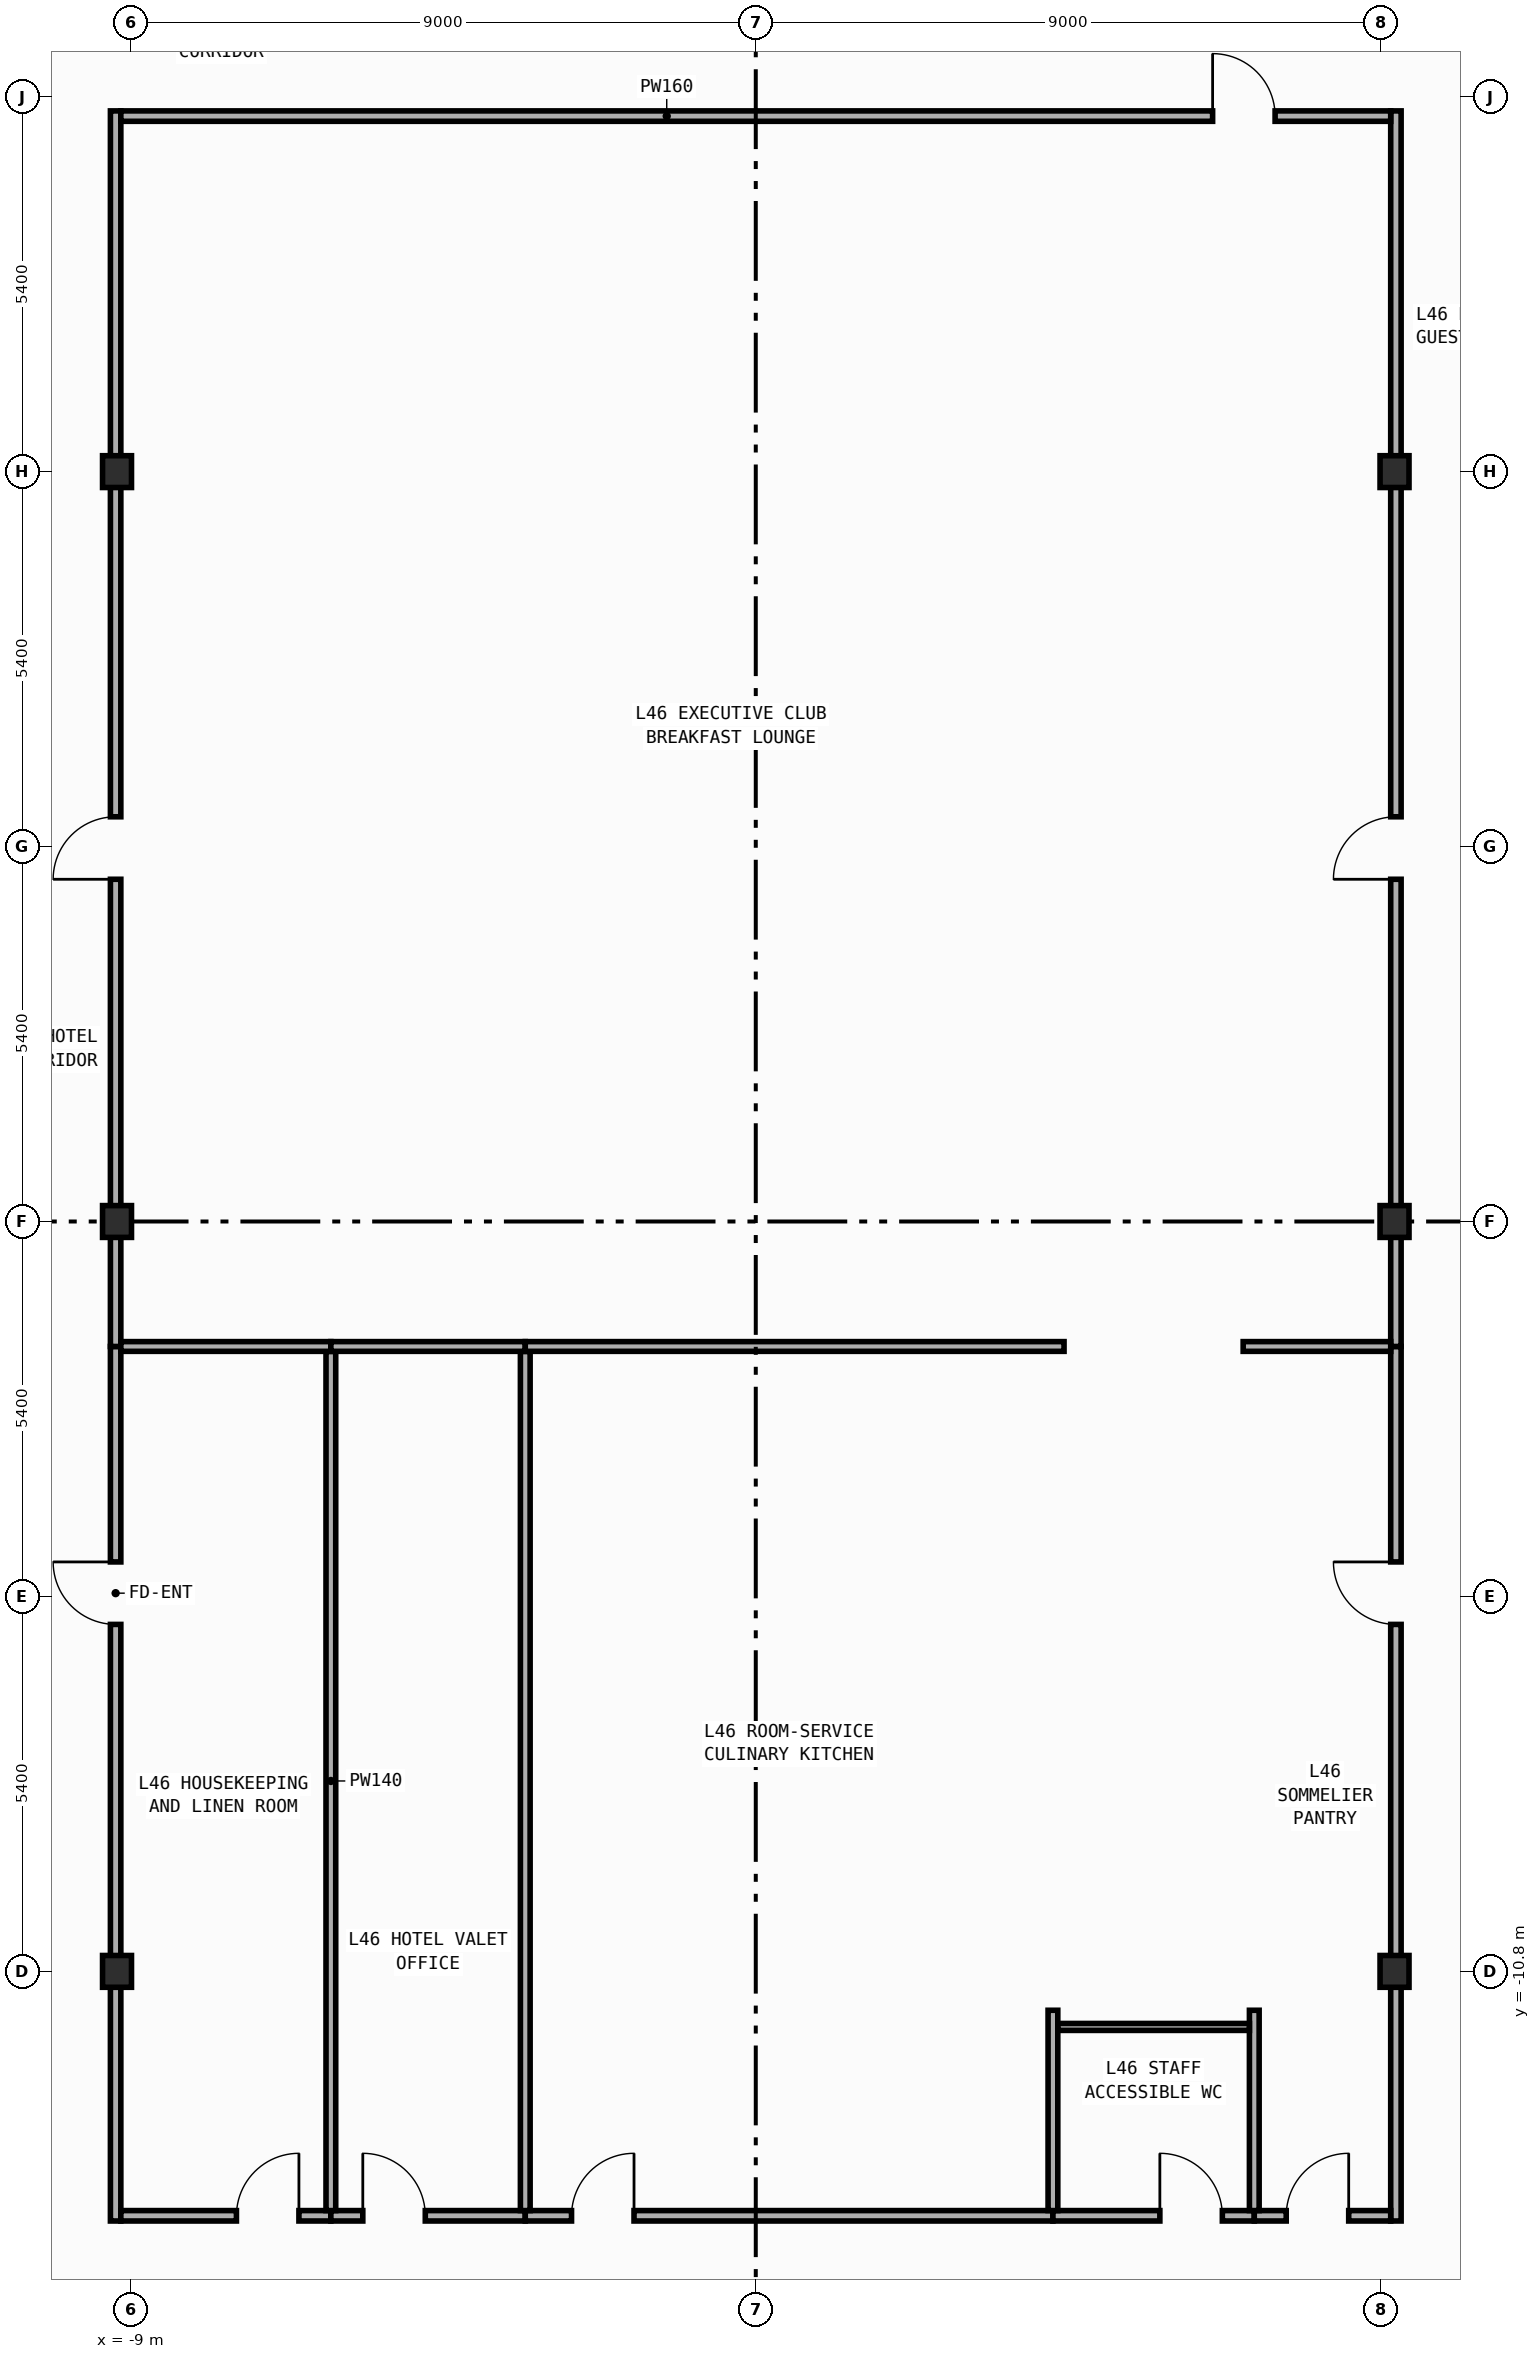
"""IFC4 building model, lengths in metres.
Left out: names, types, materials, properties, quantities, classifications, styles, units other than length and angle.
Written with IfcOpenShell. Run it as: python <this file> out.ifc"""

import sys

from ifc_helpers import new_model, si_unit, direction, frame, frame_2d, origin, origin_2d, place, context, subcontext, project, spatial, rectangle, i_section, extrude, element, fill, save


model = new_model("IFC4")
c1 = context("Model", 3, precision=1e-05, world=origin(), true_north=direction((0.0, 1.0)))
c2 = subcontext(c1, "Body", "Model", "MODEL_VIEW")
j1 = project(units=[si_unit("LENGTHUNIT", "METRE"), si_unit("PLANEANGLEUNIT", "RADIAN")], contexts=[c1])
p1 = place(None, origin())
s1 = spatial("IfcSite", under=j1, at=p1, CompositionType="ELEMENT")
p2 = place(p1, origin())
s2 = spatial("IfcBuilding", under=s1, at=p2, CompositionType="ELEMENT")
p3 = place(p2, frame((0.0, 0.0, 199.2)))
s3 = spatial("IfcBuildingStorey", under=s2, at=p3, CompositionType="ELEMENT", Elevation=199.2)
for number, where, z_axis, x_axis in (
    (1, (-9.2, -10.8, 0.0), (0.0, 0.0, 1.0), (1.0, 0.0, 0.0)),
    (2, (-9.2, 0.0, 0.0), (0.0, 0.0, 1.0), (1.0, 0.0, 0.0)),
    (3, (-9.2, 10.8, 0.0), (0.0, 0.0, 1.0), (1.0, 0.0, 0.0)),
    (4, (9.2, -10.8, 0.0), (0.0, 0.0, 1.0), (1.0, 0.0, 0.0)),
    (5, (9.2, 0.0, 0.0), (0.0, 0.0, 1.0), (1.0, 0.0, 0.0)),
    (6, (9.2, 10.8, 0.0), (0.0, 0.0, 1.0), (1.0, 0.0, 0.0)),
):
    element("IfcColumn", number, at=place(p3, frame(where, z_axis=z_axis, x_axis=x_axis)), inside=s3, PredefinedType="COLUMN", context=c2, shape_type="SweptSolid", body=[
        extrude(i_section(OverallWidth=0.417, OverallDepth=0.458, WebThickness=0.03, FlangeThickness=0.05, FilletRadius=0.022, at=origin_2d()), origin(), (0.0, 0.0, 1.0), 3.8),
    ])
p4 = place(p3, frame((-9.22, -14.395, 0.0), z_axis=(0.0, 0.0, 1.0), x_axis=(0.0, 1.0, 0.0)))
e7 = element("IfcWall", 7, at=p4, inside=s3, PredefinedType="PARTITIONING", context=c2, shape_type="SweptSolid", body=[
    extrude(rectangle(XDim=12.595, YDim=0.15, at=frame_2d((6.297, 0.0))), origin(), (0.0, 0.0, 1.0), 2.952),
])
p5 = place(p4, frame((8.592, 0.0, 0.0)))
e8 = element("IfcOpeningElement", 8, at=p5, cuts=e7, PredefinedType="OPENING", context=c2, shape_type="SweptSolid", body=[
    extrude(rectangle(XDim=0.9, YDim=2.15, at=frame_2d((0.45, 1.075))), frame((0.0, 0.085, 0.0), z_axis=(0.0, -1.0, 0.0), x_axis=(1.0, 0.0, 0.0)), (0.0, 0.0, 1.0), 0.17),
])
p6 = place(p3, frame((-9.22, -1.8, 0.0), z_axis=(0.0, 0.0, 1.0), x_axis=(0.0, 1.0, 0.0)))
e9 = element("IfcWall", 9, at=p6, inside=s3, PredefinedType="PARTITIONING", context=c2, shape_type="SweptSolid", body=[
    extrude(rectangle(XDim=17.795, YDim=0.15, at=frame_2d((8.897, 0.0))), origin(), (0.0, 0.0, 1.0), 2.952),
])
p7 = place(p6, frame((6.729, 0.0, 0.0)))
e10 = element("IfcOpeningElement", 10, at=p7, cuts=e9, PredefinedType="OPENING", context=c2, shape_type="SweptSolid", body=[
    extrude(rectangle(XDim=0.9, YDim=2.15, at=frame_2d((0.45, 1.075))), frame((0.0, 0.085, 0.0), z_axis=(0.0, -1.0, 0.0), x_axis=(1.0, 0.0, 0.0)), (0.0, 0.0, 1.0), 0.17),
])
p8 = place(p3, frame((9.22, -14.395, 0.0), z_axis=(0.0, 0.0, 1.0), x_axis=(0.0, 1.0, 0.0)))
e11 = element("IfcWall", 11, at=p8, inside=s3, PredefinedType="PARTITIONING", context=c2, shape_type="SweptSolid", body=[
    extrude(rectangle(XDim=12.595, YDim=0.15, at=frame_2d((6.297, 0.0))), origin(), (0.0, 0.0, 1.0), 2.952),
])
p9 = place(p8, frame((8.592, 0.0, 0.0)))
e12 = element("IfcOpeningElement", 12, at=p9, cuts=e11, PredefinedType="OPENING", context=c2, shape_type="SweptSolid", body=[
    extrude(rectangle(XDim=0.9, YDim=2.15, at=frame_2d((0.45, 1.075))), frame((0.0, 0.085, 0.0), z_axis=(0.0, -1.0, 0.0), x_axis=(1.0, 0.0, 0.0)), (0.0, 0.0, 1.0), 0.17),
])
p10 = place(p3, frame((9.22, -1.8, 0.0), z_axis=(0.0, 0.0, 1.0), x_axis=(0.0, 1.0, 0.0)))
e13 = element("IfcWall", 13, at=p10, inside=s3, PredefinedType="PARTITIONING", context=c2, shape_type="SweptSolid", body=[
    extrude(rectangle(XDim=17.795, YDim=0.15, at=frame_2d((8.897, 0.0))), origin(), (0.0, 0.0, 1.0), 2.952),
])
p11 = place(p10, frame((6.729, 0.0, 0.0)))
e14 = element("IfcOpeningElement", 14, at=p11, cuts=e13, PredefinedType="OPENING", context=c2, shape_type="SweptSolid", body=[
    extrude(rectangle(XDim=0.9, YDim=2.15, at=frame_2d((0.45, 1.075))), frame((0.0, 0.085, 0.0), z_axis=(0.0, -1.0, 0.0), x_axis=(1.0, 0.0, 0.0)), (0.0, 0.0, 1.0), 0.17),
])
p12 = place(p3, frame((-9.145, 15.92, 0.0), z_axis=(0.0, 0.0, 1.0), x_axis=(1.0, 0.0, 0.0)))
e15 = element("IfcWall", 15, at=p12, inside=s3, PredefinedType="PARTITIONING", context=c2, shape_type="SweptSolid", body=[
    extrude(rectangle(XDim=18.29, YDim=0.15, at=frame_2d((9.145, 0.0))), origin(), (0.0, 0.0, 1.0), 3.54),
])
p13 = place(p12, frame((15.725, 0.0, 0.0)))
e16 = element("IfcOpeningElement", 16, at=p13, cuts=e15, PredefinedType="OPENING", context=c2, shape_type="SweptSolid", body=[
    extrude(rectangle(XDim=0.9, YDim=2.15, at=frame_2d((0.45, 1.075))), frame((0.0, 0.085, 0.0), z_axis=(0.0, -1.0, 0.0), x_axis=(1.0, 0.0, 0.0)), (0.0, 0.0, 1.0), 0.17),
])
p14 = place(p3, frame((-9.145, -14.32, 0.0), z_axis=(0.0, 0.0, 1.0), x_axis=(1.0, 0.0, 0.0)))
e17 = element("IfcWall", 17, at=p14, inside=s3, PredefinedType="PARTITIONING", context=c2, shape_type="SweptSolid", body=[
    extrude(rectangle(XDim=3.025, YDim=0.15, at=frame_2d((1.512, 0.0))), origin(), (0.0, 0.0, 1.0), 3.54),
])
p15 = place(p14, frame((1.665, 0.0, 0.0)))
e18 = element("IfcOpeningElement", 18, at=p15, cuts=e17, PredefinedType="OPENING", context=c2, shape_type="SweptSolid", body=[
    extrude(rectangle(XDim=0.9, YDim=2.15, at=frame_2d((0.45, 1.075))), frame((0.0, 0.085, 0.0), z_axis=(0.0, -1.0, 0.0), x_axis=(1.0, 0.0, 0.0)), (0.0, 0.0, 1.0), 0.17),
])
p16 = place(p3, frame((-6.12, -14.32, 0.0), z_axis=(0.0, 0.0, 1.0), x_axis=(1.0, 0.0, 0.0)))
e19 = element("IfcWall", 19, at=p16, inside=s3, PredefinedType="PARTITIONING", context=c2, shape_type="SweptSolid", body=[
    extrude(rectangle(XDim=2.8, YDim=0.15, at=frame_2d((1.4, 0.0))), origin(), (0.0, 0.0, 1.0), 3.54),
])
p17 = place(p16, frame((0.46, 0.0, 0.0)))
e20 = element("IfcOpeningElement", 20, at=p17, cuts=e19, PredefinedType="OPENING", context=c2, shape_type="SweptSolid", body=[
    extrude(rectangle(XDim=0.9, YDim=2.15, at=frame_2d((0.45, 1.075))), frame((0.0, 0.085, 0.0), z_axis=(0.0, -1.0, 0.0), x_axis=(1.0, 0.0, 0.0)), (0.0, 0.0, 1.0), 0.17),
])
p18 = place(p3, frame((-3.32, -14.32, 0.0), z_axis=(0.0, 0.0, 1.0), x_axis=(1.0, 0.0, 0.0)))
e21 = element("IfcWall", 21, at=p18, inside=s3, PredefinedType="PARTITIONING", context=c2, shape_type="SweptSolid", body=[
    extrude(rectangle(XDim=7.6, YDim=0.15, at=frame_2d((3.8, 0.0))), origin(), (0.0, 0.0, 1.0), 3.54),
])
p19 = place(p18, frame((0.667, 0.0, 0.0)))
e22 = element("IfcOpeningElement", 22, at=p19, cuts=e21, PredefinedType="OPENING", context=c2, shape_type="SweptSolid", body=[
    extrude(rectangle(XDim=0.9, YDim=2.15, at=frame_2d((0.45, 1.075))), frame((0.0, 0.085, 0.0), z_axis=(0.0, -1.0, 0.0), x_axis=(1.0, 0.0, 0.0)), (0.0, 0.0, 1.0), 0.17),
])
p20 = place(p3, frame((4.28, -14.32, 0.0), z_axis=(0.0, 0.0, 1.0), x_axis=(1.0, 0.0, 0.0)))
e23 = element("IfcWall", 23, at=p20, inside=s3, PredefinedType="PARTITIONING", context=c2, shape_type="SweptSolid", body=[
    extrude(rectangle(XDim=2.9, YDim=0.15, at=frame_2d((1.45, 0.0))), origin(), (0.0, 0.0, 1.0), 3.54),
])
p21 = place(p20, frame((1.54, 0.0, 0.0)))
e24 = element("IfcOpeningElement", 24, at=p21, cuts=e23, PredefinedType="OPENING", context=c2, shape_type="SweptSolid", body=[
    extrude(rectangle(XDim=0.9, YDim=2.15, at=frame_2d((0.45, 1.075))), frame((0.0, 0.085, 0.0), z_axis=(0.0, -1.0, 0.0), x_axis=(1.0, 0.0, 0.0)), (0.0, 0.0, 1.0), 0.17),
])
p22 = place(p3, frame((7.18, -14.32, 0.0), z_axis=(0.0, 0.0, 1.0), x_axis=(1.0, 0.0, 0.0)))
e25 = element("IfcWall", 25, at=p22, inside=s3, PredefinedType="PARTITIONING", context=c2, shape_type="SweptSolid", body=[
    extrude(rectangle(XDim=1.965, YDim=0.15, at=frame_2d((0.982, 0.0))), origin(), (0.0, 0.0, 1.0), 3.54),
])
p23 = place(p22, frame((0.46, 0.0, 0.0)))
e26 = element("IfcOpeningElement", 26, at=p23, cuts=e25, PredefinedType="OPENING", context=c2, shape_type="SweptSolid", body=[
    extrude(rectangle(XDim=0.9, YDim=2.15, at=frame_2d((0.45, 1.075))), frame((0.0, 0.085, 0.0), z_axis=(0.0, -1.0, 0.0), x_axis=(1.0, 0.0, 0.0)), (0.0, 0.0, 1.0), 0.17),
])
p24 = place(p3, frame((-6.12, -14.245, 0.0), z_axis=(0.0, 0.0, 1.0), x_axis=(0.0, 1.0, 0.0)))
e27 = element("IfcWall", 27, at=p24, inside=s3, PredefinedType="PARTITIONING", context=c2, shape_type="SweptSolid", body=[
    extrude(rectangle(XDim=12.375, YDim=0.14, at=frame_2d((6.188, 0.0))), origin(), (0.0, 0.0, 1.0), 3.54),
])
p25 = place(p3, frame((-9.145, -1.8, 0.0), z_axis=(0.0, 0.0, 1.0), x_axis=(1.0, 0.0, 0.0)))
e28 = element("IfcWall", 28, at=p25, inside=s3, PredefinedType="PARTITIONING", context=c2, shape_type="SweptSolid", body=[
    extrude(rectangle(XDim=3.025, YDim=0.14, at=frame_2d((1.512, 0.0))), origin(), (0.0, 0.0, 1.0), 3.54),
])
p26 = place(p3, frame((-3.32, -14.245, 0.0), z_axis=(0.0, 0.0, 1.0), x_axis=(0.0, 1.0, 0.0)))
e29 = element("IfcWall", 29, at=p26, inside=s3, PredefinedType="PARTITIONING", context=c2, shape_type="SweptSolid", body=[
    extrude(rectangle(XDim=12.375, YDim=0.14, at=frame_2d((6.188, 0.0))), origin(), (0.0, 0.0, 1.0), 3.54),
])
p27 = place(p3, frame((-6.12, -1.8, 0.0), z_axis=(0.0, 0.0, 1.0), x_axis=(1.0, 0.0, 0.0)))
e30 = element("IfcWall", 30, at=p27, inside=s3, PredefinedType="PARTITIONING", context=c2, shape_type="SweptSolid", body=[
    extrude(rectangle(XDim=2.8, YDim=0.14, at=frame_2d((1.4, 0.0))), origin(), (0.0, 0.0, 1.0), 3.54),
])
p28 = place(p3, frame((4.28, -14.245, 0.0), z_axis=(0.0, 0.0, 1.0), x_axis=(0.0, 1.0, 0.0)))
e31 = element("IfcWall", 31, at=p28, inside=s3, PredefinedType="PARTITIONING", context=c2, shape_type="SweptSolid", body=[
    extrude(rectangle(XDim=2.885, YDim=0.14, at=frame_2d((1.442, 0.0))), origin(), (0.0, 0.0, 1.0), 3.54),
])
p29 = place(p3, frame((-3.32, -1.8, 0.0), z_axis=(0.0, 0.0, 1.0), x_axis=(1.0, 0.0, 0.0)))
e32 = element("IfcWall", 32, at=p29, inside=s3, PredefinedType="PARTITIONING", context=c2, shape_type="SweptSolid", body=[
    extrude(rectangle(XDim=7.76, YDim=0.14, at=frame_2d((3.88, 0.0))), origin(), (0.0, 0.0, 1.0), 3.54),
])
p30 = place(p3, frame((7.18, -14.245, 0.0), z_axis=(0.0, 0.0, 1.0), x_axis=(0.0, 1.0, 0.0)))
e33 = element("IfcWall", 33, at=p30, inside=s3, PredefinedType="PARTITIONING", context=c2, shape_type="SweptSolid", body=[
    extrude(rectangle(XDim=2.885, YDim=0.14, at=frame_2d((1.442, 0.0))), origin(), (0.0, 0.0, 1.0), 3.54),
])
p31 = place(p3, frame((7.02, -1.8, 0.0), z_axis=(0.0, 0.0, 1.0), x_axis=(1.0, 0.0, 0.0)))
e34 = element("IfcWall", 34, at=p31, inside=s3, PredefinedType="PARTITIONING", context=c2, shape_type="SweptSolid", body=[
    extrude(rectangle(XDim=2.125, YDim=0.14, at=frame_2d((1.062, 0.0))), origin(), (0.0, 0.0, 1.0), 3.54),
])
p32 = place(p3, frame((4.35, -11.6, 0.0), z_axis=(0.0, 0.0, 1.0), x_axis=(1.0, 0.0, 0.0)))
e35 = element("IfcWall", 35, at=p32, inside=s3, PredefinedType="PARTITIONING", context=c2, shape_type="SweptSolid", body=[
    extrude(rectangle(XDim=2.76, YDim=0.1, at=frame_2d((1.38, 0.0))), origin(), (0.0, 0.0, 1.0), 3.54),
])
p33 = place(p5, origin())
e36 = element("IfcDoor", 36, at=p33, inside=s3, OperationType="SINGLE_SWING_RIGHT", PredefinedType="DOOR", context=c2, shape_type="SweptSolid", body=[
    extrude(rectangle(XDim=0.9, YDim=2.15, at=frame_2d((0.45, 1.075))), frame((0.0, 0.025, 0.0), z_axis=(0.0, -1.0, 0.0), x_axis=(1.0, 0.0, 0.0)), (0.0, 0.0, 1.0), 0.05),
])
fill(e8, e36)
p34 = place(p7, origin())
e37 = element("IfcDoor", 37, at=p34, inside=s3, OperationType="SINGLE_SWING_LEFT", PredefinedType="DOOR", context=c2, shape_type="SweptSolid", body=[
    extrude(rectangle(XDim=0.9, YDim=2.15, at=frame_2d((0.45, 1.075))), frame((0.0, 0.025, 0.0), z_axis=(0.0, -1.0, 0.0), x_axis=(1.0, 0.0, 0.0)), (0.0, 0.0, 1.0), 0.05),
])
fill(e10, e37)
p35 = place(p9, origin())
e38 = element("IfcDoor", 38, at=p35, inside=s3, OperationType="SINGLE_SWING_RIGHT", PredefinedType="DOOR", context=c2, shape_type="SweptSolid", body=[
    extrude(rectangle(XDim=0.9, YDim=2.15, at=frame_2d((0.45, 1.075))), frame((0.0, 0.025, 0.0), z_axis=(0.0, -1.0, 0.0), x_axis=(1.0, 0.0, 0.0)), (0.0, 0.0, 1.0), 0.05),
])
fill(e12, e38)
p36 = place(p11, origin())
e39 = element("IfcDoor", 39, at=p36, inside=s3, OperationType="SINGLE_SWING_LEFT", PredefinedType="DOOR", context=c2, shape_type="SweptSolid", body=[
    extrude(rectangle(XDim=0.9, YDim=2.15, at=frame_2d((0.45, 1.075))), frame((0.0, 0.025, 0.0), z_axis=(0.0, -1.0, 0.0), x_axis=(1.0, 0.0, 0.0)), (0.0, 0.0, 1.0), 0.05),
])
fill(e14, e39)
p37 = place(p13, origin())
e40 = element("IfcDoor", 40, at=p37, inside=s3, OperationType="SINGLE_SWING_LEFT", PredefinedType="DOOR", context=c2, shape_type="SweptSolid", body=[
    extrude(rectangle(XDim=0.9, YDim=2.15, at=frame_2d((0.45, 1.075))), frame((0.0, 0.025, 0.0), z_axis=(0.0, -1.0, 0.0), x_axis=(1.0, 0.0, 0.0)), (0.0, 0.0, 1.0), 0.05),
])
fill(e16, e40)
p38 = place(p15, origin())
e41 = element("IfcDoor", 41, at=p38, inside=s3, OperationType="SINGLE_SWING_RIGHT", PredefinedType="DOOR", context=c2, shape_type="SweptSolid", body=[
    extrude(rectangle(XDim=0.9, YDim=2.15, at=frame_2d((0.45, 1.075))), frame((0.0, 0.025, 0.0), z_axis=(0.0, -1.0, 0.0), x_axis=(1.0, 0.0, 0.0)), (0.0, 0.0, 1.0), 0.05),
])
fill(e18, e41)
p39 = place(p17, origin())
e42 = element("IfcDoor", 42, at=p39, inside=s3, OperationType="SINGLE_SWING_LEFT", PredefinedType="DOOR", context=c2, shape_type="SweptSolid", body=[
    extrude(rectangle(XDim=0.9, YDim=2.15, at=frame_2d((0.45, 1.075))), frame((0.0, 0.025, 0.0), z_axis=(0.0, -1.0, 0.0), x_axis=(1.0, 0.0, 0.0)), (0.0, 0.0, 1.0), 0.05),
])
fill(e20, e42)
p40 = place(p19, origin())
e43 = element("IfcDoor", 43, at=p40, inside=s3, OperationType="SINGLE_SWING_RIGHT", PredefinedType="DOOR", context=c2, shape_type="SweptSolid", body=[
    extrude(rectangle(XDim=0.9, YDim=2.15, at=frame_2d((0.45, 1.075))), frame((0.0, 0.025, 0.0), z_axis=(0.0, -1.0, 0.0), x_axis=(1.0, 0.0, 0.0)), (0.0, 0.0, 1.0), 0.05),
])
fill(e22, e43)
p41 = place(p21, origin())
e44 = element("IfcDoor", 44, at=p41, inside=s3, OperationType="SINGLE_SWING_LEFT", PredefinedType="DOOR", context=c2, shape_type="SweptSolid", body=[
    extrude(rectangle(XDim=0.9, YDim=2.15, at=frame_2d((0.45, 1.075))), frame((0.0, 0.025, 0.0), z_axis=(0.0, -1.0, 0.0), x_axis=(1.0, 0.0, 0.0)), (0.0, 0.0, 1.0), 0.05),
])
fill(e24, e44)
p42 = place(p23, origin())
e45 = element("IfcDoor", 45, at=p42, inside=s3, OperationType="SINGLE_SWING_RIGHT", PredefinedType="DOOR", context=c2, shape_type="SweptSolid", body=[
    extrude(rectangle(XDim=0.9, YDim=2.15, at=frame_2d((0.45, 1.075))), frame((0.0, 0.025, 0.0), z_axis=(0.0, -1.0, 0.0), x_axis=(1.0, 0.0, 0.0)), (0.0, 0.0, 1.0), 0.05),
])
fill(e26, e45)
save(model, sys.argv[1])
